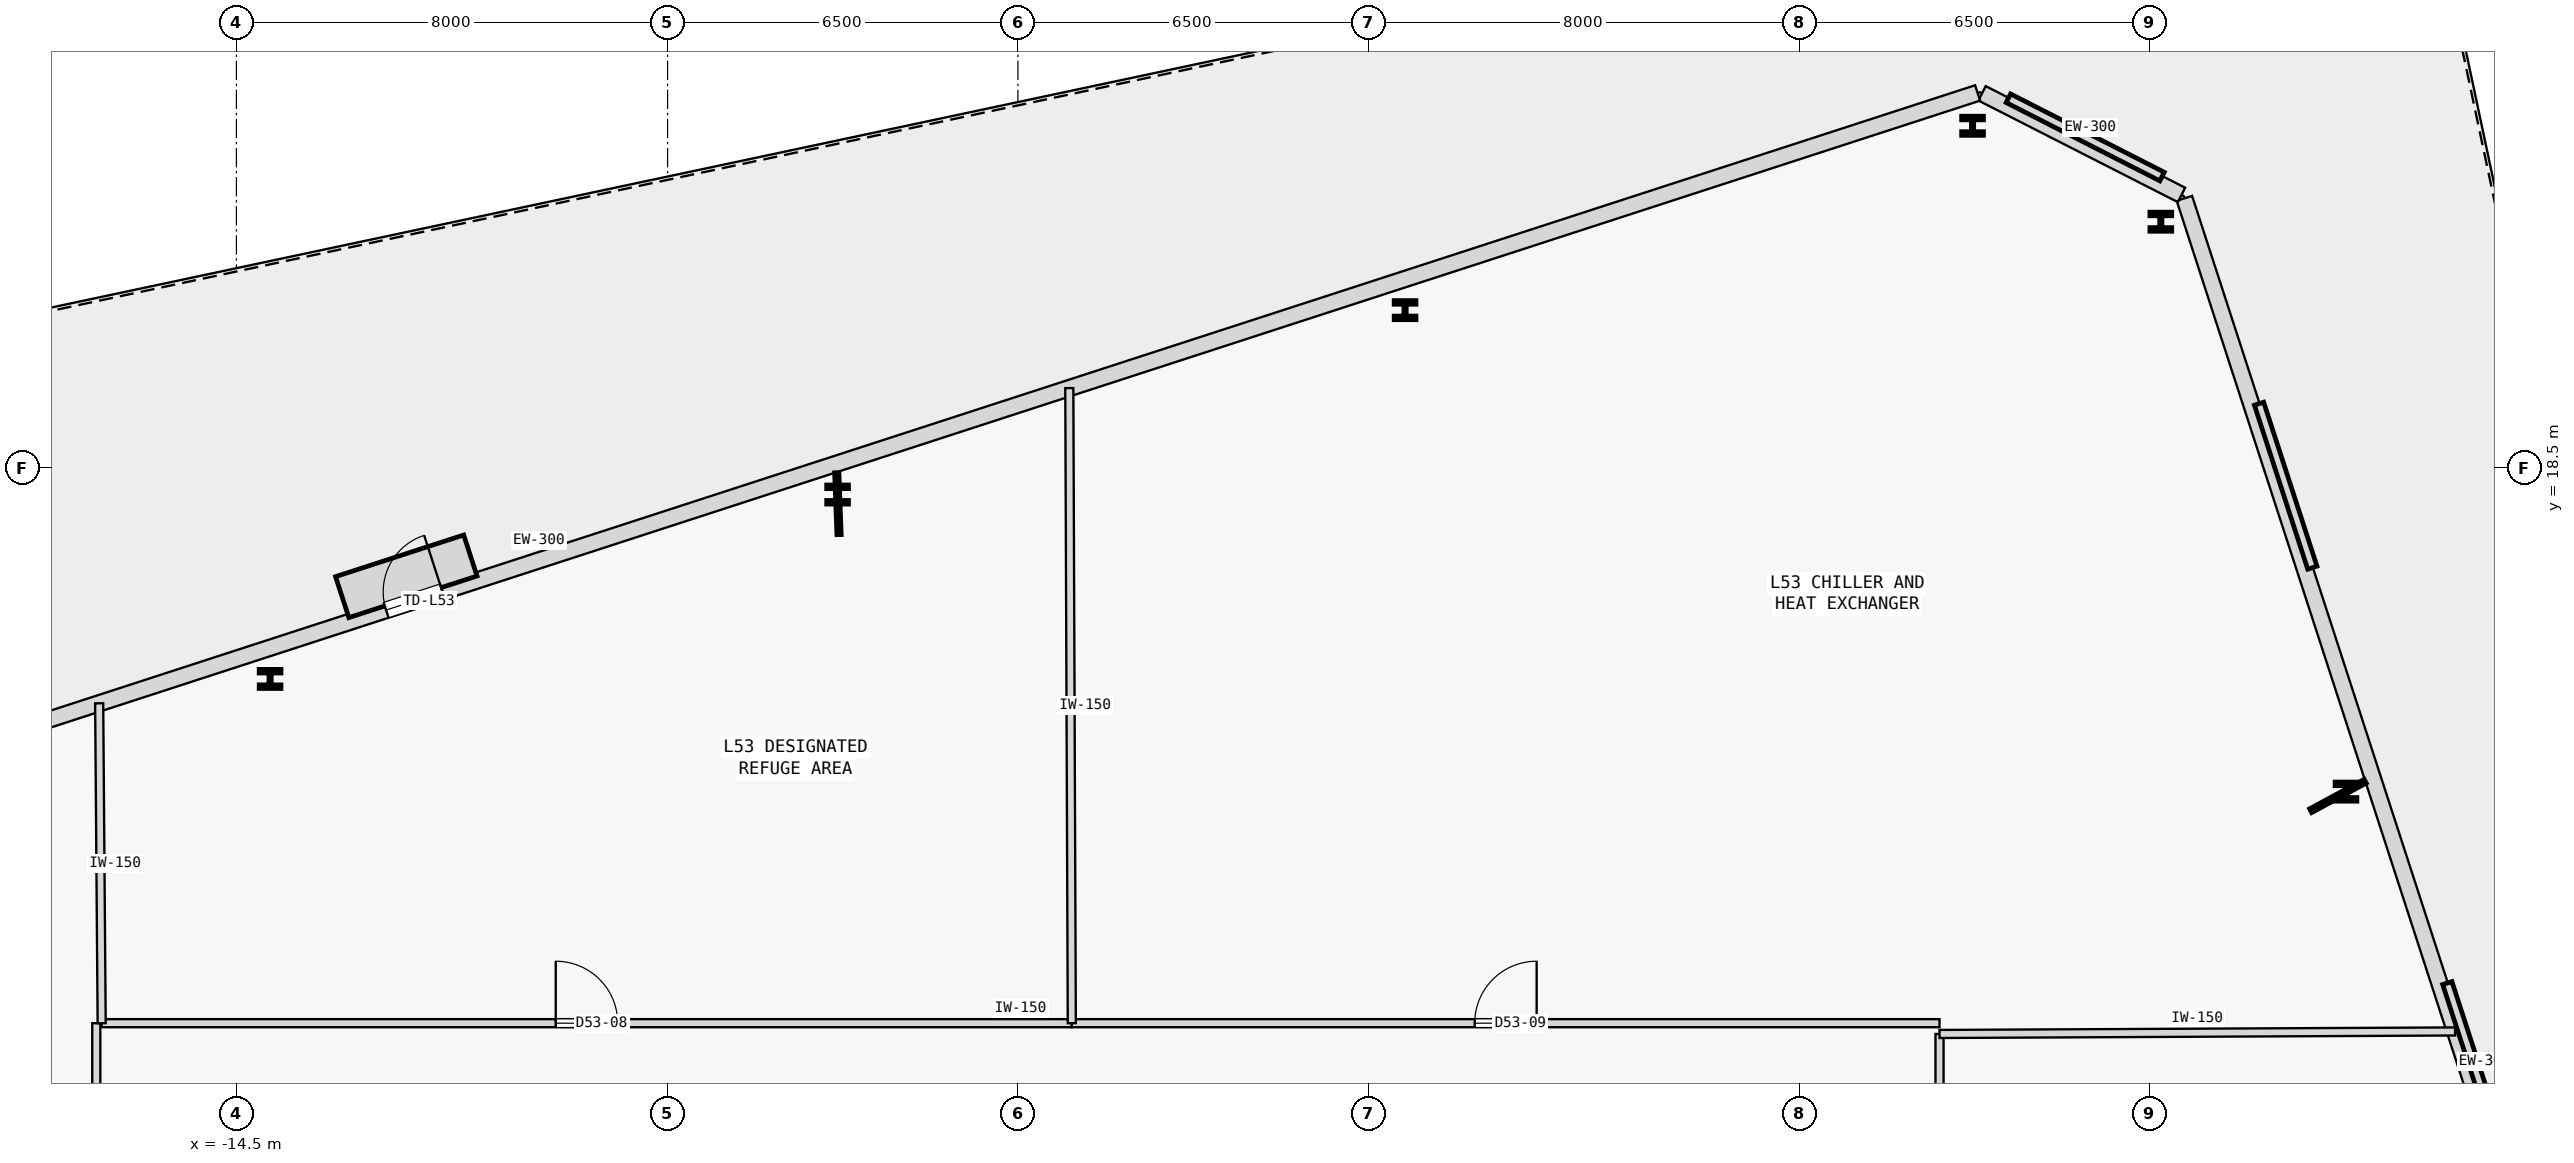
"""IFC4 building model, lengths in metres.
Left out: names, types, materials, properties, quantities, classifications, styles, units other than length and angle.
Written with IfcOpenShell. Run it as: python <this file> out.ifc"""

import sys

from ifc_helpers import new_model, si_unit, direction, frame, frame_2d, origin, origin_2d, place, context, subcontext, project, spatial, rectangle, i_section, extrude, element, fill, save


model = new_model("IFC4")
c1 = context("Model", 3, precision=1e-05, world=origin(), true_north=direction((0.0, 1.0)))
c2 = subcontext(c1, "Body", "Model", "MODEL_VIEW")
j1 = project(units=[si_unit("LENGTHUNIT", "METRE"), si_unit("PLANEANGLEUNIT", "RADIAN")], contexts=[c1])
p1 = place(None, origin())
s1 = spatial("IfcSite", under=j1, at=p1, CompositionType="ELEMENT")
p2 = place(p1, origin())
s2 = spatial("IfcBuilding", under=s1, at=p2, CompositionType="ELEMENT")
p3 = place(p2, frame((0.0, 0.0, 202.4)))
s3 = spatial("IfcBuildingStorey", under=s2, at=p3, CompositionType="ELEMENT", Elevation=202.4)
for number, where, z_axis, x_axis in (
    (1, (24.642, 12.497, 0.0), (0.0, 0.0, 1.0), (1.0, 0.0, 0.0)),
    (2, (21.206, 23.071, 0.0), (0.0, 0.0, 1.0), (1.0, 0.0, 0.0)),
    (3, (17.713, 24.851, 0.0), (0.0, 0.0, 1.0), (1.0, 0.0, 0.0)),
    (4, (7.184, 21.43, 0.0), (0.0, 0.0, 1.0), (1.0, 0.0, 0.0)),
    (5, (-3.346, 18.009, 0.0), (0.0, 0.0, 1.0), (1.0, 0.0, 0.0)),
    (6, (-13.875, 14.587, 0.0), (0.0, 0.0, 1.0), (1.0, 0.0, 0.0)),
):
    element("IfcColumn", number, at=place(p3, frame(where, z_axis=z_axis, x_axis=x_axis)), inside=s3, PredefinedType="COLUMN", context=c2, shape_type="SweptSolid", body=[
        extrude(i_section(OverallWidth=0.405, OverallDepth=0.355, WebThickness=0.042, FlangeThickness=0.068, FilletRadius=0.015, at=origin_2d()), origin(), (0.0, 0.0, 1.0), 4.4),
    ])
p4 = place(p3, frame((32.122, -8.746, 0.0), z_axis=(0.0, 0.0, 1.0), x_axis=(-0.309017534148, 0.951056340912, 0.0)))
e7 = element("IfcWall", 7, at=p4, inside=s3, PredefinedType="STANDARD", context=c2, shape_type="SweptSolid", body=[
    extrude(rectangle(XDim=33.91, YDim=0.3, at=frame_2d((16.955, 0.0))), origin(), (0.0, 0.0, 1.0), 4.15),
])
p5 = place(p3, frame((21.589, 23.568, 0.0), z_axis=(0.0, 0.0, 1.0), x_axis=(-0.891003151549, 0.453997118856, 0.0)))
e8 = element("IfcWall", 8, at=p5, inside=s3, PredefinedType="STANDARD", context=c2, shape_type="SweptSolid", body=[
    extrude(rectangle(XDim=4.153, YDim=0.3, at=frame_2d((2.076, 0.0))), origin(), (0.0, 0.0, 1.0), 4.15),
])
p6 = place(p3, frame((17.806, 25.46, 0.0), z_axis=(0.0, 0.0, 1.0), x_axis=(-0.951056753609, -0.309016263999, 0.0)))
e9 = element("IfcWall", 9, at=p6, inside=s3, PredefinedType="STANDARD", context=c2, shape_type="SweptSolid", body=[
    extrude(rectangle(XDim=55.91, YDim=0.3, at=frame_2d((27.955, 0.0))), origin(), (0.0, 0.0, 1.0), 4.15),
])
p7 = place(p6, frame((29.949, 0.0, 0.0)))
e10 = element("IfcOpeningElement", 10, at=p7, cuts=e9, PredefinedType="OPENING", context=c2, shape_type="SweptSolid", body=[
    extrude(rectangle(XDim=1.1, YDim=2.2, at=frame_2d((0.55, 1.1))), frame((0.0, 0.16, 0.0), z_axis=(0.0, -1.0, 0.0), x_axis=(1.0, 0.0, 0.0)), (0.0, 0.0, 1.0), 0.32),
])
p8 = place(p3, frame((-17.0, 8.2, 0.0), z_axis=(0.0, 0.0, 1.0), x_axis=(1.0, 0.0, 0.0)))
e11 = element("IfcWall", 11, at=p8, inside=s3, PredefinedType="PARTITIONING", context=c2, shape_type="SweptSolid", body=[
    extrude(rectangle(XDim=18.0, YDim=0.15, at=frame_2d((9.0, 0.0))), origin(), (0.0, 0.0, 1.0), 4.15),
])
p9 = place(p8, frame((8.425, 0.0, 0.0)))
e12 = element("IfcOpeningElement", 12, at=p9, cuts=e11, PredefinedType="OPENING", context=c2, shape_type="SweptSolid", body=[
    extrude(rectangle(XDim=1.15, YDim=2.15, at=frame_2d((0.575, 1.075))), frame((0.0, 0.085, 0.0), z_axis=(0.0, -1.0, 0.0), x_axis=(1.0, 0.0, 0.0)), (0.0, 0.0, 1.0), 0.17),
])
p10 = place(p3, frame((1.0, 8.2, 0.0), z_axis=(0.0, 0.0, 1.0), x_axis=(1.0, 0.0, 0.0)))
e13 = element("IfcWall", 13, at=p10, inside=s3, PredefinedType="PARTITIONING", context=c2, shape_type="SweptSolid", body=[
    extrude(rectangle(XDim=16.1, YDim=0.15, at=frame_2d((8.05, 0.0))), origin(), (0.0, 0.0, 1.0), 4.15),
])
p11 = place(p10, frame((7.475, 0.0, 0.0)))
e14 = element("IfcOpeningElement", 14, at=p11, cuts=e13, PredefinedType="OPENING", context=c2, shape_type="SweptSolid", body=[
    extrude(rectangle(XDim=1.15, YDim=2.15, at=frame_2d((0.575, 1.075))), frame((0.0, 0.085, 0.0), z_axis=(0.0, -1.0, 0.0), x_axis=(1.0, 0.0, 0.0)), (0.0, 0.0, 1.0), 0.17),
])
p12 = place(p3, frame((-17.1, -8.2, 0.0), z_axis=(0.0, 0.0, 1.0), x_axis=(0.0, 1.0, 0.0)))
e15 = element("IfcWall", 15, at=p12, inside=s3, PredefinedType="PARTITIONING", context=c2, shape_type="SweptSolid", body=[
    extrude(rectangle(XDim=16.4, YDim=0.15, at=frame_2d((8.2, 0.0))), origin(), (0.0, 0.0, 1.0), 4.15),
])
p13 = place(p12, frame((5.165, 0.0, 0.0)))
e16 = element("IfcOpeningElement", 16, at=p13, cuts=e15, PredefinedType="OPENING", context=c2, shape_type="SweptSolid", body=[
    extrude(rectangle(XDim=1.15, YDim=2.15, at=frame_2d((0.575, 1.075))), frame((0.0, 0.085, 0.0), z_axis=(0.0, -1.0, 0.0), x_axis=(1.0, 0.0, 0.0)), (0.0, 0.0, 1.0), 0.17),
])
p14 = place(p3, frame((17.1, -8.0, 0.0), z_axis=(0.0, 0.0, 1.0), x_axis=(0.0, 1.0, 0.0)))
e17 = element("IfcWall", 17, at=p14, inside=s3, PredefinedType="PARTITIONING", context=c2, shape_type="SweptSolid", body=[
    extrude(rectangle(XDim=16.0, YDim=0.15, at=frame_2d((8.0, 0.0))), origin(), (0.0, 0.0, 1.0), 4.15),
])
p15 = place(p14, frame((5.025, 0.0, 0.0)))
e18 = element("IfcOpeningElement", 18, at=p15, cuts=e17, PredefinedType="OPENING", context=c2, shape_type="SweptSolid", body=[
    extrude(rectangle(XDim=1.15, YDim=2.15, at=frame_2d((0.575, 1.075))), frame((0.0, 0.085, 0.0), z_axis=(0.0, -1.0, 0.0), x_axis=(1.0, 0.0, 0.0)), (0.0, 0.0, 1.0), 0.17),
])
p16 = place(p3, frame((1.0, 8.2, 0.0), z_axis=(0.0, 0.0, 1.0), x_axis=(-0.003936406405, 0.999992252322, 0.0)))
e19 = element("IfcWall", 19, at=p16, inside=s3, PredefinedType="PARTITIONING", context=c2, shape_type="SweptSolid", body=[
    extrude(rectangle(XDim=11.784, YDim=0.15, at=frame_2d((5.892, 0.0))), origin(), (0.0, 0.0, 1.0), 4.15),
])
p17 = place(p3, frame((-17.0, 8.2, 0.0), z_axis=(0.0, 0.0, 1.0), x_axis=(-0.007814832104, 0.999969463733, 0.0)))
e20 = element("IfcWall", 20, at=p17, inside=s3, PredefinedType="PARTITIONING", context=c2, shape_type="SweptSolid", body=[
    extrude(rectangle(XDim=5.936, YDim=0.15, at=frame_2d((2.968, 0.0))), origin(), (0.0, 0.0, 1.0), 4.15),
])
p18 = place(p3, frame((17.1, 8.0, 0.0), z_axis=(0.0, 0.0, 1.0), x_axis=(0.999988243005, 0.004849108421, 0.0)))
e21 = element("IfcWall", 21, at=p18, inside=s3, PredefinedType="PARTITIONING", context=c2, shape_type="SweptSolid", body=[
    extrude(rectangle(XDim=9.566, YDim=0.15, at=frame_2d((4.783, 0.0))), origin(), (0.0, 0.0, 1.0), 4.15),
])
p19 = place(p7, frame((1.1, 0.0, 0.0), z_axis=(0.0, 0.0, 1.0), x_axis=(-1.0, 0.0, 0.0)))
e22 = element("IfcDoor", 22, at=p19, inside=s3, OperationType="SINGLE_SWING_LEFT", PredefinedType="DOOR", context=c2, shape_type="SweptSolid", body=[
    extrude(rectangle(XDim=1.1, YDim=2.2, at=frame_2d((0.55, 1.1))), frame((0.0, 0.025, 0.0), z_axis=(0.0, -1.0, 0.0), x_axis=(1.0, 0.0, 0.0)), (0.0, 0.0, 1.0), 0.05),
])
fill(e10, e22)
p20 = place(p9, origin())
e23 = element("IfcDoor", 23, at=p20, inside=s3, OperationType="SINGLE_SWING_LEFT", PredefinedType="DOOR", context=c2, shape_type="SweptSolid", body=[
    extrude(rectangle(XDim=1.15, YDim=2.15, at=frame_2d((0.575, 1.075))), frame((0.0, 0.025, 0.0), z_axis=(0.0, -1.0, 0.0), x_axis=(1.0, 0.0, 0.0)), (0.0, 0.0, 1.0), 0.05),
])
fill(e12, e23)
p21 = place(p11, origin())
e24 = element("IfcDoor", 24, at=p21, inside=s3, OperationType="SINGLE_SWING_RIGHT", PredefinedType="DOOR", context=c2, shape_type="SweptSolid", body=[
    extrude(rectangle(XDim=1.15, YDim=2.15, at=frame_2d((0.575, 1.075))), frame((0.0, 0.025, 0.0), z_axis=(0.0, -1.0, 0.0), x_axis=(1.0, 0.0, 0.0)), (0.0, 0.0, 1.0), 0.05),
])
fill(e14, e24)
save(model, sys.argv[1])
